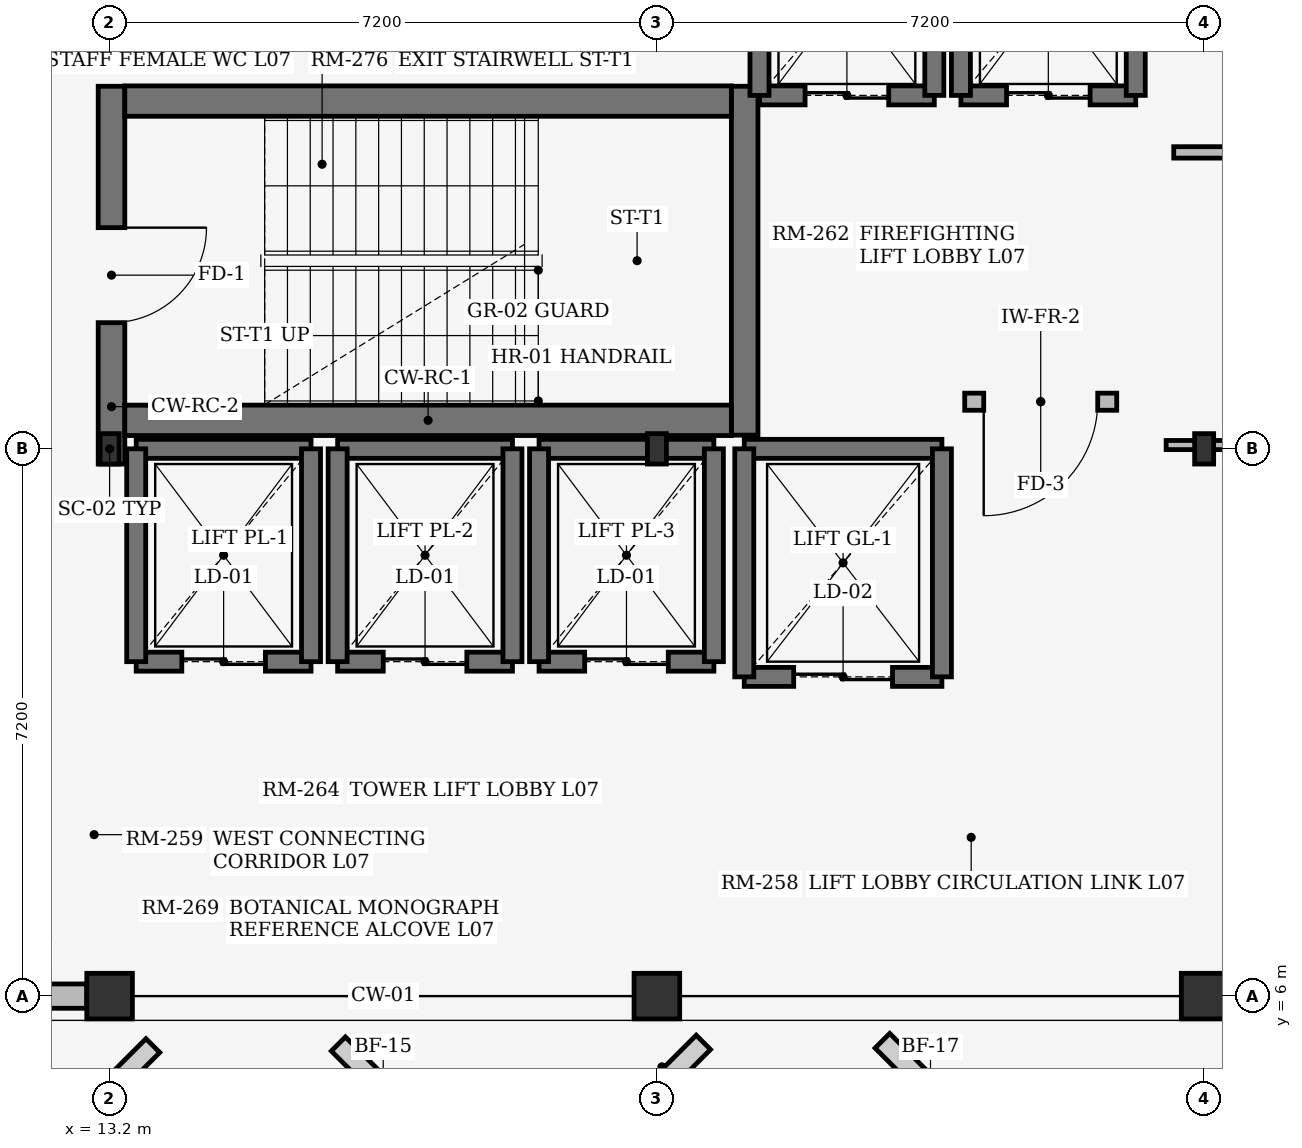
"""IFC4 building model, lengths in metres.
Left out: names, types, materials, properties, quantities, classifications, styles, units other than length and angle.
Written with IfcOpenShell. Run it as: python <this file> out.ifc"""

import sys

from ifc_helpers import new_model, si_unit, direction, frame, frame_2d, origin, origin_2d, place, context, subcontext, project, spatial, rectangle, i_section, extrude, element, fill, save


model = new_model("IFC4")
c1 = context("Model", 3, precision=1e-05, world=origin(), true_north=direction((0.0, 1.0)))
c2 = subcontext(c1, "Body", "Model", "MODEL_VIEW")
j1 = project(units=[si_unit("LENGTHUNIT", "METRE"), si_unit("PLANEANGLEUNIT", "RADIAN")], contexts=[c1])
p1 = place(None, origin())
s1 = spatial("IfcSite", under=j1, at=p1, CompositionType="ELEMENT")
p2 = place(p1, origin())
s2 = spatial("IfcBuilding", under=s1, at=p2, CompositionType="ELEMENT")
p3 = place(p2, frame((0.0, 0.0, 28.8)))
s3 = spatial("IfcBuildingStorey", under=s2, at=p3, CompositionType="ELEMENT", Elevation=28.8)
p4 = place(p3, frame((13.2, 6.0, 0.0), z_axis=(0.0, 0.0, 1.0), x_axis=(1.0, 0.0, 0.0)))
e1 = element("IfcColumn", 1, at=p4, inside=s3, PredefinedType="COLUMN", context=c2, shape_type="SweptSolid", body=[
    extrude(rectangle(XDim=0.6, YDim=0.6, at=origin_2d()), origin(), (0.0, 0.0, 1.0), 3.62),
])
p5 = place(p3, frame((13.2, 13.2, 0.0), z_axis=(0.0, 0.0, 1.0), x_axis=(1.0, 0.0, 0.0)))
e2 = element("IfcColumn", 2, at=p5, inside=s3, PredefinedType="COLUMN", context=c2, shape_type="SweptSolid", body=[
    extrude(i_section(OverallWidth=0.25, OverallDepth=0.4, WebThickness=0.01, FlangeThickness=0.013, at=origin_2d()), origin(), (0.0, 0.0, 1.0), 3.62),
])
p6 = place(p3, frame((20.4, 6.0, 0.0), z_axis=(0.0, 0.0, 1.0), x_axis=(1.0, 0.0, 0.0)))
e3 = element("IfcColumn", 3, at=p6, inside=s3, PredefinedType="COLUMN", context=c2, shape_type="SweptSolid", body=[
    extrude(rectangle(XDim=0.6, YDim=0.6, at=origin_2d()), origin(), (0.0, 0.0, 1.0), 3.62),
])
p7 = place(p3, frame((20.4, 13.2, 0.0), z_axis=(0.0, 0.0, 1.0), x_axis=(1.0, 0.0, 0.0)))
e4 = element("IfcColumn", 4, at=p7, inside=s3, PredefinedType="COLUMN", context=c2, shape_type="SweptSolid", body=[
    extrude(i_section(OverallWidth=0.25, OverallDepth=0.4, WebThickness=0.01, FlangeThickness=0.013, at=origin_2d()), origin(), (0.0, 0.0, 1.0), 3.62),
])
p8 = place(p3, frame((27.6, 6.0, 0.0), z_axis=(0.0, 0.0, 1.0), x_axis=(1.0, 0.0, 0.0)))
e5 = element("IfcColumn", 5, at=p8, inside=s3, PredefinedType="COLUMN", context=c2, shape_type="SweptSolid", body=[
    extrude(rectangle(XDim=0.6, YDim=0.6, at=origin_2d()), origin(), (0.0, 0.0, 1.0), 3.62),
])
p9 = place(p3, frame((27.6, 13.2, 0.0), z_axis=(0.0, 0.0, 1.0), x_axis=(1.0, 0.0, 0.0)))
e6 = element("IfcColumn", 6, at=p9, inside=s3, PredefinedType="COLUMN", context=c2, shape_type="SweptSolid", body=[
    extrude(i_section(OverallWidth=0.25, OverallDepth=0.4, WebThickness=0.01, FlangeThickness=0.013, at=origin_2d()), origin(), (0.0, 0.0, 1.0), 3.62),
])
p10 = place(p3, frame((6.3, 6.0, 0.0), z_axis=(0.0, 0.0, 1.0), x_axis=(1.0, 0.0, 0.0)))
e7 = element("IfcWall", 7, at=p10, inside=s3, PredefinedType="STANDARD", context=c2, shape_type="SweptSolid", body=[
    extrude(rectangle(XDim=6.6, YDim=0.32, at=frame_2d((3.3, 0.0))), origin(), (0.0, 0.0, 1.0), 3.1),
])
p11 = place(p10, frame((2.15, 0.0, 0.75)))
e8 = element("IfcOpeningElement", 8, at=p11, cuts=e7, PredefinedType="OPENING", context=c2, shape_type="SweptSolid", body=[
    extrude(rectangle(XDim=2.3, YDim=1.35, at=frame_2d((1.15, 0.675))), frame((0.0, 0.17, 0.0), z_axis=(0.0, -1.0, 0.0), x_axis=(1.0, 0.0, 0.0)), (0.0, 0.0, 1.0), 0.34),
])
p12 = place(p3, frame((13.225, 13.0, 0.0), z_axis=(0.0, 0.0, 1.0), x_axis=(0.0, 1.0, 0.0)))
e9 = element("IfcWall", 9, at=p12, inside=s3, PredefinedType="SHEAR", context=c2, shape_type="SweptSolid", body=[
    extrude(rectangle(XDim=4.97, YDim=0.35, at=frame_2d((2.485, 0.0))), origin(), (0.0, 0.0, 1.0), 3.62),
])
p13 = place(p12, frame((1.86, 0.0, 0.0)))
e10 = element("IfcOpeningElement", 10, at=p13, cuts=e9, PredefinedType="OPENING", context=c2, shape_type="SweptSolid", body=[
    extrude(rectangle(XDim=1.25, YDim=2.2, at=frame_2d((0.625, 1.1))), frame((0.0, 0.185, 0.0), z_axis=(0.0, -1.0, 0.0), x_axis=(1.0, 0.0, 0.0)), (0.0, 0.0, 1.0), 0.37),
])
p14 = place(p3, frame((21.555, 13.38, 0.0), z_axis=(0.0, 0.0, 1.0), x_axis=(0.0, 1.0, 0.0)))
e11 = element("IfcWall", 11, at=p14, inside=s3, PredefinedType="SHEAR", context=c2, shape_type="SweptSolid", body=[
    extrude(rectangle(XDim=4.59, YDim=0.35, at=frame_2d((2.295, 0.0))), origin(), (0.0, 0.0, 1.0), 3.62),
])
for number, where, z_axis, x_axis in (
    (12, (13.4, 13.575, 0.0), (0.0, 0.0, 1.0), (1.0, 0.0, 0.0)),
    (13, (13.4, 17.775, 0.0), (0.0, 0.0, 1.0), (1.0, 0.0, 0.0)),
):
    element("IfcWall", number, at=place(p3, frame(where, z_axis=z_axis, x_axis=x_axis)), inside=s3, PredefinedType="SHEAR", context=c2, shape_type="SweptSolid", body=[
        extrude(rectangle(XDim=7.98, YDim=0.4, at=frame_2d((3.99, 0.0))), origin(), (0.0, 0.0, 1.0), 3.62),
    ])
p15 = place(p3, frame((21.75, 17.85, 0.0), z_axis=(0.0, 0.0, 1.0), x_axis=(1.0, 0.0, 0.0)))
e14 = element("IfcWall", 14, at=p15, inside=s3, PredefinedType="SHEAR", context=c2, shape_type="SweptSolid", body=[
    extrude(rectangle(XDim=2.3, YDim=0.25, at=frame_2d((1.15, 0.0))), origin(), (0.0, 0.0, 1.0), 3.62),
])
p16 = place(p15, frame((0.6, 0.0, 0.0)))
e15 = element("IfcOpeningElement", 15, at=p16, cuts=e14, PredefinedType="OPENING", context=c2, shape_type="SweptSolid", body=[
    extrude(rectangle(XDim=1.1, YDim=2.2, at=frame_2d((0.55, 1.1))), frame((0.0, 0.135, 0.0), z_axis=(0.0, -1.0, 0.0), x_axis=(1.0, 0.0, 0.0)), (0.0, 0.0, 1.0), 0.27),
])
for number, where, z_axis, x_axis in (
    (16, (21.75, 17.85, 0.0), (0.0, 0.0, 1.0), (0.0, 1.0, 0.0)),
    (17, (24.05, 17.85, 0.0), (0.0, 0.0, 1.0), (0.0, 1.0, 0.0)),
):
    element("IfcWall", number, at=place(p3, frame(where, z_axis=z_axis, x_axis=x_axis)), inside=s3, PredefinedType="SHEAR", context=c2, shape_type="SweptSolid", body=[
        extrude(rectangle(XDim=2.7, YDim=0.25, at=frame_2d((1.35, 0.0))), origin(), (0.0, 0.0, 1.0), 3.62),
    ])
p17 = place(p3, frame((24.4, 17.85, 0.0), z_axis=(0.0, 0.0, 1.0), x_axis=(1.0, 0.0, 0.0)))
e18 = element("IfcWall", 18, at=p17, inside=s3, PredefinedType="SHEAR", context=c2, shape_type="SweptSolid", body=[
    extrude(rectangle(XDim=2.3, YDim=0.25, at=frame_2d((1.15, 0.0))), origin(), (0.0, 0.0, 1.0), 3.62),
])
p18 = place(p17, frame((0.6, 0.0, 0.0)))
e19 = element("IfcOpeningElement", 19, at=p18, cuts=e18, PredefinedType="OPENING", context=c2, shape_type="SweptSolid", body=[
    extrude(rectangle(XDim=1.1, YDim=2.2, at=frame_2d((0.55, 1.1))), frame((0.0, 0.135, 0.0), z_axis=(0.0, -1.0, 0.0), x_axis=(1.0, 0.0, 0.0)), (0.0, 0.0, 1.0), 0.27),
])
for number, where, z_axis, x_axis in (
    (20, (24.4, 17.85, 0.0), (0.0, 0.0, 1.0), (0.0, 1.0, 0.0)),
    (21, (26.7, 17.85, 0.0), (0.0, 0.0, 1.0), (0.0, 1.0, 0.0)),
):
    element("IfcWall", number, at=place(p3, frame(where, z_axis=z_axis, x_axis=x_axis)), inside=s3, PredefinedType="SHEAR", context=c2, shape_type="SweptSolid", body=[
        extrude(rectangle(XDim=2.7, YDim=0.25, at=frame_2d((1.35, 0.0))), origin(), (0.0, 0.0, 1.0), 3.62),
    ])
p19 = place(p3, frame((13.55, 10.4, 0.0), z_axis=(0.0, 0.0, 1.0), x_axis=(1.0, 0.0, 0.0)))
e22 = element("IfcWall", 22, at=p19, inside=s3, PredefinedType="SHEAR", context=c2, shape_type="SweptSolid", body=[
    extrude(rectangle(XDim=2.3, YDim=0.25, at=frame_2d((1.15, 0.0))), origin(), (0.0, 0.0, 1.0), 3.62),
])
p20 = place(p19, frame((0.6, 0.0, 0.0)))
e23 = element("IfcOpeningElement", 23, at=p20, cuts=e22, PredefinedType="OPENING", context=c2, shape_type="SweptSolid", body=[
    extrude(rectangle(XDim=1.1, YDim=2.2, at=frame_2d((0.55, 1.1))), frame((0.0, 0.135, 0.0), z_axis=(0.0, -1.0, 0.0), x_axis=(1.0, 0.0, 0.0)), (0.0, 0.0, 1.0), 0.27),
])
p21 = place(p3, frame((13.55, 13.2, 0.0), z_axis=(0.0, 0.0, 1.0), x_axis=(1.0, 0.0, 0.0)))
e24 = element("IfcWall", 24, at=p21, inside=s3, PredefinedType="SHEAR", context=c2, shape_type="SweptSolid", body=[
    extrude(rectangle(XDim=2.3, YDim=0.25, at=frame_2d((1.15, 0.0))), origin(), (0.0, 0.0, 1.0), 3.62),
])
for number, where, z_axis, x_axis in (
    (25, (13.55, 10.4, 0.0), (0.0, 0.0, 1.0), (0.0, 1.0, 0.0)),
    (26, (15.85, 10.4, 0.0), (0.0, 0.0, 1.0), (0.0, 1.0, 0.0)),
):
    element("IfcWall", number, at=place(p3, frame(where, z_axis=z_axis, x_axis=x_axis)), inside=s3, PredefinedType="SHEAR", context=c2, shape_type="SweptSolid", body=[
        extrude(rectangle(XDim=2.8, YDim=0.25, at=frame_2d((1.4, 0.0))), origin(), (0.0, 0.0, 1.0), 3.62),
    ])
p22 = place(p3, frame((16.2, 10.4, 0.0), z_axis=(0.0, 0.0, 1.0), x_axis=(1.0, 0.0, 0.0)))
e27 = element("IfcWall", 27, at=p22, inside=s3, PredefinedType="SHEAR", context=c2, shape_type="SweptSolid", body=[
    extrude(rectangle(XDim=2.3, YDim=0.25, at=frame_2d((1.15, 0.0))), origin(), (0.0, 0.0, 1.0), 3.62),
])
p23 = place(p22, frame((0.6, 0.0, 0.0)))
e28 = element("IfcOpeningElement", 28, at=p23, cuts=e27, PredefinedType="OPENING", context=c2, shape_type="SweptSolid", body=[
    extrude(rectangle(XDim=1.1, YDim=2.2, at=frame_2d((0.55, 1.1))), frame((0.0, 0.135, 0.0), z_axis=(0.0, -1.0, 0.0), x_axis=(1.0, 0.0, 0.0)), (0.0, 0.0, 1.0), 0.27),
])
p24 = place(p3, frame((16.2, 13.2, 0.0), z_axis=(0.0, 0.0, 1.0), x_axis=(1.0, 0.0, 0.0)))
e29 = element("IfcWall", 29, at=p24, inside=s3, PredefinedType="SHEAR", context=c2, shape_type="SweptSolid", body=[
    extrude(rectangle(XDim=2.3, YDim=0.25, at=frame_2d((1.15, 0.0))), origin(), (0.0, 0.0, 1.0), 3.62),
])
for number, where, z_axis, x_axis in (
    (30, (16.2, 10.4, 0.0), (0.0, 0.0, 1.0), (0.0, 1.0, 0.0)),
    (31, (18.5, 10.4, 0.0), (0.0, 0.0, 1.0), (0.0, 1.0, 0.0)),
):
    element("IfcWall", number, at=place(p3, frame(where, z_axis=z_axis, x_axis=x_axis)), inside=s3, PredefinedType="SHEAR", context=c2, shape_type="SweptSolid", body=[
        extrude(rectangle(XDim=2.8, YDim=0.25, at=frame_2d((1.4, 0.0))), origin(), (0.0, 0.0, 1.0), 3.62),
    ])
p25 = place(p3, frame((18.85, 10.4, 0.0), z_axis=(0.0, 0.0, 1.0), x_axis=(1.0, 0.0, 0.0)))
e32 = element("IfcWall", 32, at=p25, inside=s3, PredefinedType="SHEAR", context=c2, shape_type="SweptSolid", body=[
    extrude(rectangle(XDim=2.3, YDim=0.25, at=frame_2d((1.15, 0.0))), origin(), (0.0, 0.0, 1.0), 3.62),
])
p26 = place(p25, frame((0.6, 0.0, 0.0)))
e33 = element("IfcOpeningElement", 33, at=p26, cuts=e32, PredefinedType="OPENING", context=c2, shape_type="SweptSolid", body=[
    extrude(rectangle(XDim=1.1, YDim=2.2, at=frame_2d((0.55, 1.1))), frame((0.0, 0.135, 0.0), z_axis=(0.0, -1.0, 0.0), x_axis=(1.0, 0.0, 0.0)), (0.0, 0.0, 1.0), 0.27),
])
p27 = place(p3, frame((18.85, 13.2, 0.0), z_axis=(0.0, 0.0, 1.0), x_axis=(1.0, 0.0, 0.0)))
e34 = element("IfcWall", 34, at=p27, inside=s3, PredefinedType="SHEAR", context=c2, shape_type="SweptSolid", body=[
    extrude(rectangle(XDim=2.3, YDim=0.25, at=frame_2d((1.15, 0.0))), origin(), (0.0, 0.0, 1.0), 3.62),
])
for number, where, z_axis, x_axis in (
    (35, (18.85, 10.4, 0.0), (0.0, 0.0, 1.0), (0.0, 1.0, 0.0)),
    (36, (21.15, 10.4, 0.0), (0.0, 0.0, 1.0), (0.0, 1.0, 0.0)),
):
    element("IfcWall", number, at=place(p3, frame(where, z_axis=z_axis, x_axis=x_axis)), inside=s3, PredefinedType="SHEAR", context=c2, shape_type="SweptSolid", body=[
        extrude(rectangle(XDim=2.8, YDim=0.25, at=frame_2d((1.4, 0.0))), origin(), (0.0, 0.0, 1.0), 3.62),
    ])
p28 = place(p3, frame((21.55, 10.2, 0.0), z_axis=(0.0, 0.0, 1.0), x_axis=(1.0, 0.0, 0.0)))
e37 = element("IfcWall", 37, at=p28, inside=s3, PredefinedType="SHEAR", context=c2, shape_type="SweptSolid", body=[
    extrude(rectangle(XDim=2.6, YDim=0.25, at=frame_2d((1.3, 0.0))), origin(), (0.0, 0.0, 1.0), 3.62),
])
p29 = place(p28, frame((0.65, 0.0, 0.0)))
e38 = element("IfcOpeningElement", 38, at=p29, cuts=e37, PredefinedType="OPENING", context=c2, shape_type="SweptSolid", body=[
    extrude(rectangle(XDim=1.3, YDim=2.25, at=frame_2d((0.65, 1.125))), frame((0.0, 0.135, 0.0), z_axis=(0.0, -1.0, 0.0), x_axis=(1.0, 0.0, 0.0)), (0.0, 0.0, 1.0), 0.27),
])
p30 = place(p3, frame((21.55, 13.2, 0.0), z_axis=(0.0, 0.0, 1.0), x_axis=(1.0, 0.0, 0.0)))
e39 = element("IfcWall", 39, at=p30, inside=s3, PredefinedType="SHEAR", context=c2, shape_type="SweptSolid", body=[
    extrude(rectangle(XDim=2.6, YDim=0.25, at=frame_2d((1.3, 0.0))), origin(), (0.0, 0.0, 1.0), 3.62),
])
for number, where, z_axis, x_axis in (
    (40, (21.55, 10.2, 0.0), (0.0, 0.0, 1.0), (0.0, 1.0, 0.0)),
    (41, (24.15, 10.2, 0.0), (0.0, 0.0, 1.0), (0.0, 1.0, 0.0)),
):
    element("IfcWall", number, at=place(p3, frame(where, z_axis=z_axis, x_axis=x_axis)), inside=s3, PredefinedType="SHEAR", context=c2, shape_type="SweptSolid", body=[
        extrude(rectangle(XDim=3.0, YDim=0.25, at=frame_2d((1.5, 0.0))), origin(), (0.0, 0.0, 1.0), 3.62),
    ])
p31 = place(p3, frame((24.45, 13.82, 0.0), z_axis=(0.0, 0.0, 1.0), x_axis=(1.0, 0.0, 0.0)))
e42 = element("IfcWall", 42, at=p31, inside=s3, PredefinedType="SOLIDWALL", context=c2, shape_type="SweptSolid", body=[
    extrude(rectangle(XDim=2.0, YDim=0.225, at=frame_2d((1.0, 0.0))), origin(), (0.0, 0.0, 1.0), 3.6),
])
p32 = place(p31, frame((0.25, 0.0, 0.0)))
e43 = element("IfcOpeningElement", 43, at=p32, cuts=e42, PredefinedType="OPENING", context=c2, shape_type="SweptSolid", body=[
    extrude(rectangle(XDim=1.5, YDim=2.2, at=frame_2d((0.75, 1.1))), frame((0.0, 0.123, 0.0), z_axis=(0.0, -1.0, 0.0), x_axis=(1.0, 0.0, 0.0)), (0.0, 0.0, 1.0), 0.245),
])
p33 = place(p3, frame((27.2, 17.1, 0.0), z_axis=(0.0, 0.0, 1.0), x_axis=(1.0, 0.0, 0.0)))
e44 = element("IfcWall", 44, at=p33, inside=s3, PredefinedType="PARTITIONING", context=c2, shape_type="SweptSolid", body=[
    extrude(rectangle(XDim=7.05, YDim=0.15, at=frame_2d((3.525, 0.0))), origin(), (0.0, 0.0, 1.0), 3.6),
])
p34 = place(p33, frame((3.055, 0.0, 0.0)))
e45 = element("IfcOpeningElement", 45, at=p34, cuts=e44, PredefinedType="OPENING", context=c2, shape_type="SweptSolid", body=[
    extrude(rectangle(XDim=0.94, YDim=2.18, at=frame_2d((0.47, 1.09))), frame((0.0, 0.085, 0.0), z_axis=(0.0, -1.0, 0.0), x_axis=(1.0, 0.0, 0.0)), (0.0, 0.0, 1.0), 0.17),
])
p35 = place(p3, frame((27.1, 13.25, 0.0), z_axis=(0.0, 0.0, 1.0), x_axis=(1.0, 0.0, 0.0)))
e46 = element("IfcWall", 46, at=p35, inside=s3, PredefinedType="PARTITIONING", context=c2, shape_type="SweptSolid", body=[
    extrude(rectangle(XDim=7.4, YDim=0.12, at=frame_2d((3.7, 0.0))), origin(), (0.0, 0.0, 1.0), 3.11),
])
p36 = place(p35, frame((3.09, 0.0, 0.0)))
e47 = element("IfcOpeningElement", 47, at=p36, cuts=e46, PredefinedType="OPENING", context=c2, shape_type="SweptSolid", body=[
    extrude(rectangle(XDim=1.22, YDim=2.22, at=frame_2d((0.61, 1.11))), frame((0.0, 0.07, 0.0), z_axis=(0.0, -1.0, 0.0), x_axis=(1.0, 0.0, 0.0)), (0.0, 0.0, 1.0), 0.14),
])
p37 = place(p13, origin())
e48 = element("IfcDoor", 48, at=p37, inside=s3, OperationType="SINGLE_SWING_RIGHT", PredefinedType="DOOR", context=c2, shape_type="SweptSolid", body=[
    extrude(rectangle(XDim=1.25, YDim=2.2, at=frame_2d((0.625, 1.1))), frame((0.0, 0.025, 0.0), z_axis=(0.0, -1.0, 0.0), x_axis=(1.0, 0.0, 0.0)), (0.0, 0.0, 1.0), 0.05),
])
fill(e10, e48)
p38 = place(p16, origin())
e49 = element("IfcDoor", 49, at=p38, inside=s3, OperationType="DOUBLE_DOOR_SLIDING", PredefinedType="DOOR", context=c2, shape_type="SweptSolid", body=[
    extrude(rectangle(XDim=1.1, YDim=2.2, at=frame_2d((0.55, 1.1))), frame((0.0, 0.025, 0.0), z_axis=(0.0, -1.0, 0.0), x_axis=(1.0, 0.0, 0.0)), (0.0, 0.0, 1.0), 0.05),
])
fill(e15, e49)
p39 = place(p18, origin())
e50 = element("IfcDoor", 50, at=p39, inside=s3, OperationType="DOUBLE_DOOR_SLIDING", PredefinedType="DOOR", context=c2, shape_type="SweptSolid", body=[
    extrude(rectangle(XDim=1.1, YDim=2.2, at=frame_2d((0.55, 1.1))), frame((0.0, 0.025, 0.0), z_axis=(0.0, -1.0, 0.0), x_axis=(1.0, 0.0, 0.0)), (0.0, 0.0, 1.0), 0.05),
])
fill(e19, e50)
p40 = place(p20, origin())
e51 = element("IfcDoor", 51, at=p40, inside=s3, OperationType="DOUBLE_DOOR_SLIDING", PredefinedType="DOOR", context=c2, shape_type="SweptSolid", body=[
    extrude(rectangle(XDim=1.1, YDim=2.2, at=frame_2d((0.55, 1.1))), frame((0.0, 0.025, 0.0), z_axis=(0.0, -1.0, 0.0), x_axis=(1.0, 0.0, 0.0)), (0.0, 0.0, 1.0), 0.05),
])
fill(e23, e51)
p41 = place(p23, origin())
e52 = element("IfcDoor", 52, at=p41, inside=s3, OperationType="DOUBLE_DOOR_SLIDING", PredefinedType="DOOR", context=c2, shape_type="SweptSolid", body=[
    extrude(rectangle(XDim=1.1, YDim=2.2, at=frame_2d((0.55, 1.1))), frame((0.0, 0.025, 0.0), z_axis=(0.0, -1.0, 0.0), x_axis=(1.0, 0.0, 0.0)), (0.0, 0.0, 1.0), 0.05),
])
fill(e28, e52)
p42 = place(p26, origin())
e53 = element("IfcDoor", 53, at=p42, inside=s3, OperationType="DOUBLE_DOOR_SLIDING", PredefinedType="DOOR", context=c2, shape_type="SweptSolid", body=[
    extrude(rectangle(XDim=1.1, YDim=2.2, at=frame_2d((0.55, 1.1))), frame((0.0, 0.025, 0.0), z_axis=(0.0, -1.0, 0.0), x_axis=(1.0, 0.0, 0.0)), (0.0, 0.0, 1.0), 0.05),
])
fill(e33, e53)
p43 = place(p29, origin())
e54 = element("IfcDoor", 54, at=p43, inside=s3, OperationType="DOUBLE_DOOR_SLIDING", PredefinedType="DOOR", context=c2, shape_type="SweptSolid", body=[
    extrude(rectangle(XDim=1.3, YDim=2.25, at=frame_2d((0.65, 1.125))), frame((0.0, 0.025, 0.0), z_axis=(0.0, -1.0, 0.0), x_axis=(1.0, 0.0, 0.0)), (0.0, 0.0, 1.0), 0.05),
])
fill(e38, e54)
p44 = place(p32, frame((1.5, 0.0, 0.0), z_axis=(0.0, 0.0, 1.0), x_axis=(-1.0, 0.0, 0.0)))
e55 = element("IfcDoor", 55, at=p44, inside=s3, OperationType="SINGLE_SWING_LEFT", PredefinedType="DOOR", context=c2, shape_type="SweptSolid", body=[
    extrude(rectangle(XDim=1.5, YDim=2.2, at=frame_2d((0.75, 1.1))), frame((0.0, 0.025, 0.0), z_axis=(0.0, -1.0, 0.0), x_axis=(1.0, 0.0, 0.0)), (0.0, 0.0, 1.0), 0.05),
])
fill(e43, e55)
save(model, sys.argv[1])
